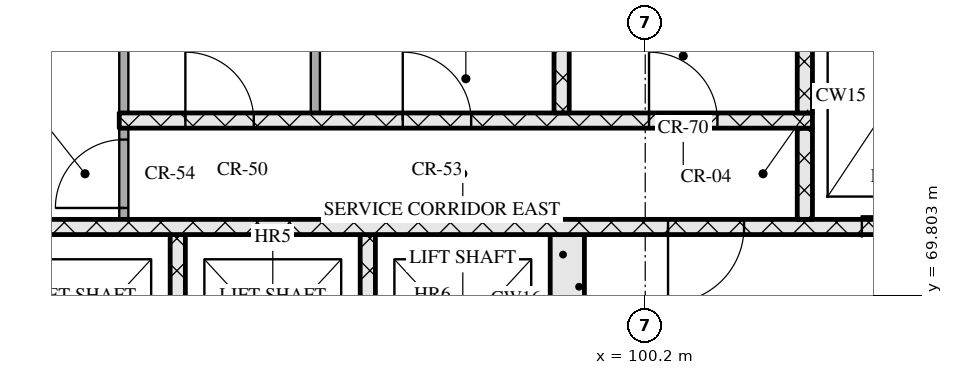
"""IFC4 building model, lengths in metres.
Left out: names, types, materials, properties, quantities, classifications, styles, units other than length and angle.
Written with IfcOpenShell. Run it as: python <this file> out.ifc"""

import sys

from ifc_helpers import new_model, si_unit, direction, frame, frame_2d, origin, place, context, subcontext, project, spatial, rectangle, extrude, element, fill, save


model = new_model("IFC4")
c1 = context("Model", 3, precision=1e-05, world=origin(), true_north=direction((0.0, 1.0)))
c2 = subcontext(c1, "Body", "Model", "MODEL_VIEW")
j1 = project(units=[si_unit("LENGTHUNIT", "METRE"), si_unit("PLANEANGLEUNIT", "RADIAN")], contexts=[c1])
p1 = place(None, origin())
s1 = spatial("IfcSite", under=j1, at=p1, CompositionType="ELEMENT")
p2 = place(p1, origin())
s2 = spatial("IfcBuilding", under=s1, at=p2, CompositionType="ELEMENT")
p3 = place(p2, frame((0.0, 0.0, 205.5)))
s3 = spatial("IfcBuildingStorey", under=s2, at=p3, CompositionType="ELEMENT", Elevation=205.5)
for number, where, z_axis, x_axis in (
    (1, (94.05, 68.0, 0.0), (0.0, 0.0, 1.0), (0.0, 1.0, 0.0)),
    (2, (96.55, 68.0, 0.0), (0.0, 0.0, 1.0), (0.0, 1.0, 0.0)),
):
    element("IfcWall", number, at=place(p3, frame(where, z_axis=z_axis, x_axis=x_axis)), inside=s3, PredefinedType="SOLIDWALL", context=c2, shape_type="SweptSolid", body=[
        extrude(rectangle(XDim=2.6, YDim=0.2, at=frame_2d((1.3, 0.0))), origin(), (0.0, 0.0, 1.0), 3.32),
    ])
p4 = place(p3, frame((99.175, 68.3, 0.0), z_axis=(0.0, 0.0, 1.0), x_axis=(0.0, 1.0, 0.0)))
e3 = element("IfcWall", 3, at=p4, inside=s3, PredefinedType="SOLIDWALL", context=c2, shape_type="SweptSolid", body=[
    extrude(rectangle(XDim=2.3, YDim=0.45, at=frame_2d((1.15, 0.0))), origin(), (0.0, 0.0, 1.0), 3.32),
])
p5 = place(p3, frame((67.8, 70.7, 0.0), z_axis=(0.0, 0.0, 1.0), x_axis=(1.0, 0.0, 0.0)))
e4 = element("IfcWall", 4, at=p5, inside=s3, PredefinedType="SOLIDWALL", context=c2, shape_type="SweptSolid", body=[
    extrude(rectangle(XDim=39.6, YDim=0.2, at=frame_2d((19.8, 0.0))), origin(), (0.0, 0.0, 1.0), 3.32),
])
p6 = place(p5, frame((0.65, 0.0, 0.0)))
e5 = element("IfcOpeningElement", 5, at=p6, cuts=e4, PredefinedType="OPENING", context=c2, shape_type="SweptSolid", body=[
    extrude(rectangle(XDim=1.1, YDim=2.1, at=frame_2d((0.55, 1.05))), frame((0.0, 0.11, 0.0), z_axis=(0.0, -1.0, 0.0), x_axis=(1.0, 0.0, 0.0)), (0.0, 0.0, 1.0), 0.22),
])
p7 = place(p5, frame((3.25, 0.0, 0.0)))
e6 = element("IfcOpeningElement", 6, at=p7, cuts=e4, PredefinedType="OPENING", context=c2, shape_type="SweptSolid", body=[
    extrude(rectangle(XDim=1.1, YDim=2.1, at=frame_2d((0.55, 1.05))), frame((0.0, 0.11, 0.0), z_axis=(0.0, -1.0, 0.0), x_axis=(1.0, 0.0, 0.0)), (0.0, 0.0, 1.0), 0.22),
])
p8 = place(p5, frame((5.9, 0.0, 0.0)))
e7 = element("IfcOpeningElement", 7, at=p8, cuts=e4, PredefinedType="OPENING", context=c2, shape_type="SweptSolid", body=[
    extrude(rectangle(XDim=1.0, YDim=2.1, at=frame_2d((0.5, 1.05))), frame((0.0, 0.11, 0.0), z_axis=(0.0, -1.0, 0.0), x_axis=(1.0, 0.0, 0.0)), (0.0, 0.0, 1.0), 0.22),
])
p9 = place(p5, frame((21.7, 0.0, 0.0)))
e8 = element("IfcOpeningElement", 8, at=p9, cuts=e4, PredefinedType="OPENING", context=c2, shape_type="SweptSolid", body=[
    extrude(rectangle(XDim=1.0, YDim=2.1, at=frame_2d((0.5, 1.05))), frame((0.0, 0.11, 0.0), z_axis=(0.0, -1.0, 0.0), x_axis=(1.0, 0.0, 0.0)), (0.0, 0.0, 1.0), 0.22),
])
p10 = place(p5, frame((32.7, 0.0, 0.0)))
e9 = element("IfcOpeningElement", 9, at=p10, cuts=e4, PredefinedType="OPENING", context=c2, shape_type="SweptSolid", body=[
    extrude(rectangle(XDim=1.0, YDim=2.1, at=frame_2d((0.5, 1.05))), frame((0.0, 0.11, 0.0), z_axis=(0.0, -1.0, 0.0), x_axis=(1.0, 0.0, 0.0)), (0.0, 0.0, 1.0), 0.22),
])
p11 = place(p5, frame((35.25, 0.0, 0.0)))
e10 = element("IfcOpeningElement", 10, at=p11, cuts=e4, PredefinedType="OPENING", context=c2, shape_type="SweptSolid", body=[
    extrude(rectangle(XDim=1.1, YDim=2.1, at=frame_2d((0.55, 1.05))), frame((0.0, 0.11, 0.0), z_axis=(0.0, -1.0, 0.0), x_axis=(1.0, 0.0, 0.0)), (0.0, 0.0, 1.0), 0.22),
])
p12 = place(p5, frame((37.85, 0.0, 0.0)))
e11 = element("IfcOpeningElement", 11, at=p12, cuts=e4, PredefinedType="OPENING", context=c2, shape_type="SweptSolid", body=[
    extrude(rectangle(XDim=1.1, YDim=2.1, at=frame_2d((0.55, 1.05))), frame((0.0, 0.11, 0.0), z_axis=(0.0, -1.0, 0.0), x_axis=(1.0, 0.0, 0.0)), (0.0, 0.0, 1.0), 0.22),
])
p13 = place(p3, frame((93.34, 70.8, 0.0), z_axis=(0.0, 0.0, 1.0), x_axis=(0.0, 1.0, 0.0)))
e12 = element("IfcWall", 12, at=p13, inside=s3, PredefinedType="PARTITIONING", context=c2, shape_type="SweptSolid", body=[
    extrude(rectangle(XDim=1.2, YDim=0.12, at=frame_2d((0.6, 0.0))), origin(), (0.0, 0.0, 1.0), 3.32),
])
p14 = place(p13, frame((0.15, 0.0, 0.0)))
e13 = element("IfcOpeningElement", 13, at=p14, cuts=e12, PredefinedType="OPENING", context=c2, shape_type="SweptSolid", body=[
    extrude(rectangle(XDim=0.9, YDim=2.1, at=frame_2d((0.45, 1.05))), frame((0.0, 0.07, 0.0), z_axis=(0.0, -1.0, 0.0), x_axis=(1.0, 0.0, 0.0)), (0.0, 0.0, 1.0), 0.14),
])
p15 = place(p3, frame((102.3, 70.8, 0.0), z_axis=(0.0, 0.0, 1.0), x_axis=(0.0, 1.0, 0.0)))
e14 = element("IfcWall", 14, at=p15, inside=s3, PredefinedType="SOLIDWALL", context=c2, shape_type="SweptSolid", body=[
    extrude(rectangle(XDim=1.2, YDim=0.2, at=frame_2d((0.6, 0.0))), origin(), (0.0, 0.0, 1.0), 3.32),
])
p16 = place(p3, frame((93.28, 72.1, 0.0), z_axis=(0.0, 0.0, 1.0), x_axis=(1.0, 0.0, 0.0)))
e15 = element("IfcWall", 15, at=p16, inside=s3, PredefinedType="SOLIDWALL", context=c2, shape_type="SweptSolid", body=[
    extrude(rectangle(XDim=9.12, YDim=0.2, at=frame_2d((4.56, 0.0))), origin(), (0.0, 0.0, 1.0), 3.32),
])
p17 = place(p16, frame((0.87, 0.0, 0.0)))
e16 = element("IfcOpeningElement", 16, at=p17, cuts=e15, PredefinedType="OPENING", context=c2, shape_type="SweptSolid", body=[
    extrude(rectangle(XDim=0.9, YDim=2.1, at=frame_2d((0.45, 1.05))), frame((0.0, 0.11, 0.0), z_axis=(0.0, -1.0, 0.0), x_axis=(1.0, 0.0, 0.0)), (0.0, 0.0, 1.0), 0.22),
])
p18 = place(p16, frame((3.73, 0.0, 0.0)))
e17 = element("IfcOpeningElement", 17, at=p18, cuts=e15, PredefinedType="OPENING", context=c2, shape_type="SweptSolid", body=[
    extrude(rectangle(XDim=0.9, YDim=2.1, at=frame_2d((0.45, 1.05))), frame((0.0, 0.11, 0.0), z_axis=(0.0, -1.0, 0.0), x_axis=(1.0, 0.0, 0.0)), (0.0, 0.0, 1.0), 0.22),
])
p19 = place(p16, frame((6.97, 0.0, 0.0)))
e18 = element("IfcOpeningElement", 18, at=p19, cuts=e15, PredefinedType="OPENING", context=c2, shape_type="SweptSolid", body=[
    extrude(rectangle(XDim=0.9, YDim=2.1, at=frame_2d((0.45, 1.05))), frame((0.0, 0.11, 0.0), z_axis=(0.0, -1.0, 0.0), x_axis=(1.0, 0.0, 0.0)), (0.0, 0.0, 1.0), 0.22),
])
for number, where, z_axis, x_axis in (
    (19, (93.34, 72.2, 0.0), (0.0, 0.0, 1.0), (0.0, 1.0, 0.0)),
    (20, (95.86, 72.2, 0.0), (0.0, 0.0, 1.0), (0.0, 1.0, 0.0)),
):
    element("IfcWall", number, at=place(p3, frame(where, z_axis=z_axis, x_axis=x_axis)), inside=s3, PredefinedType="PARTITIONING", context=c2, shape_type="SweptSolid", body=[
        extrude(rectangle(XDim=2.2, YDim=0.12, at=frame_2d((1.1, 0.0))), origin(), (0.0, 0.0, 1.0), 3.32),
    ])
for number, where, z_axis, x_axis in (
    (21, (99.1, 72.2, 0.0), (0.0, 0.0, 1.0), (0.0, 1.0, 0.0)),
    (22, (102.3, 72.2, 0.0), (0.0, 0.0, 1.0), (0.0, 1.0, 0.0)),
):
    element("IfcWall", number, at=place(p3, frame(where, z_axis=z_axis, x_axis=x_axis)), inside=s3, PredefinedType="SOLIDWALL", context=c2, shape_type="SweptSolid", body=[
        extrude(rectangle(XDim=2.2, YDim=0.2, at=frame_2d((1.1, 0.0))), origin(), (0.0, 0.0, 1.0), 3.32),
    ])
p20 = place(p10, origin())
e23 = element("IfcDoor", 23, at=p20, inside=s3, OperationType="SINGLE_SWING_RIGHT", PredefinedType="DOOR", context=c2, shape_type="SweptSolid", body=[
    extrude(rectangle(XDim=1.0, YDim=2.1, at=frame_2d((0.5, 1.05))), frame((0.0, 0.025, 0.0), z_axis=(0.0, -1.0, 0.0), x_axis=(1.0, 0.0, 0.0)), (0.0, 0.0, 1.0), 0.05),
])
fill(e9, e23)
p21 = place(p11, origin())
e24 = element("IfcDoor", 24, at=p21, inside=s3, OperationType="SLIDING_TO_RIGHT", PredefinedType="DOOR", context=c2, shape_type="SweptSolid", body=[
    extrude(rectangle(XDim=1.1, YDim=2.1, at=frame_2d((0.55, 1.05))), frame((0.0, 0.025, 0.0), z_axis=(0.0, -1.0, 0.0), x_axis=(1.0, 0.0, 0.0)), (0.0, 0.0, 1.0), 0.05),
])
fill(e10, e24)
p22 = place(p14, origin())
e25 = element("IfcDoor", 25, at=p22, inside=s3, OperationType="SINGLE_SWING_LEFT", PredefinedType="DOOR", context=c2, shape_type="SweptSolid", body=[
    extrude(rectangle(XDim=0.9, YDim=2.1, at=frame_2d((0.45, 1.05))), frame((0.0, 0.025, 0.0), z_axis=(0.0, -1.0, 0.0), x_axis=(1.0, 0.0, 0.0)), (0.0, 0.0, 1.0), 0.05),
])
fill(e13, e25)
p23 = place(p17, origin())
e26 = element("IfcDoor", 26, at=p23, inside=s3, OperationType="SINGLE_SWING_LEFT", PredefinedType="DOOR", context=c2, shape_type="SweptSolid", body=[
    extrude(rectangle(XDim=0.9, YDim=2.1, at=frame_2d((0.45, 1.05))), frame((0.0, 0.025, 0.0), z_axis=(0.0, -1.0, 0.0), x_axis=(1.0, 0.0, 0.0)), (0.0, 0.0, 1.0), 0.05),
])
fill(e16, e26)
p24 = place(p18, origin())
e27 = element("IfcDoor", 27, at=p24, inside=s3, OperationType="SINGLE_SWING_LEFT", PredefinedType="DOOR", context=c2, shape_type="SweptSolid", body=[
    extrude(rectangle(XDim=0.9, YDim=2.1, at=frame_2d((0.45, 1.05))), frame((0.0, 0.025, 0.0), z_axis=(0.0, -1.0, 0.0), x_axis=(1.0, 0.0, 0.0)), (0.0, 0.0, 1.0), 0.05),
])
fill(e17, e27)
p25 = place(p19, origin())
e28 = element("IfcDoor", 28, at=p25, inside=s3, OperationType="SINGLE_SWING_LEFT", PredefinedType="DOOR", context=c2, shape_type="SweptSolid", body=[
    extrude(rectangle(XDim=0.9, YDim=2.1, at=frame_2d((0.45, 1.05))), frame((0.0, 0.025, 0.0), z_axis=(0.0, -1.0, 0.0), x_axis=(1.0, 0.0, 0.0)), (0.0, 0.0, 1.0), 0.05),
])
fill(e18, e28)
save(model, sys.argv[1])
